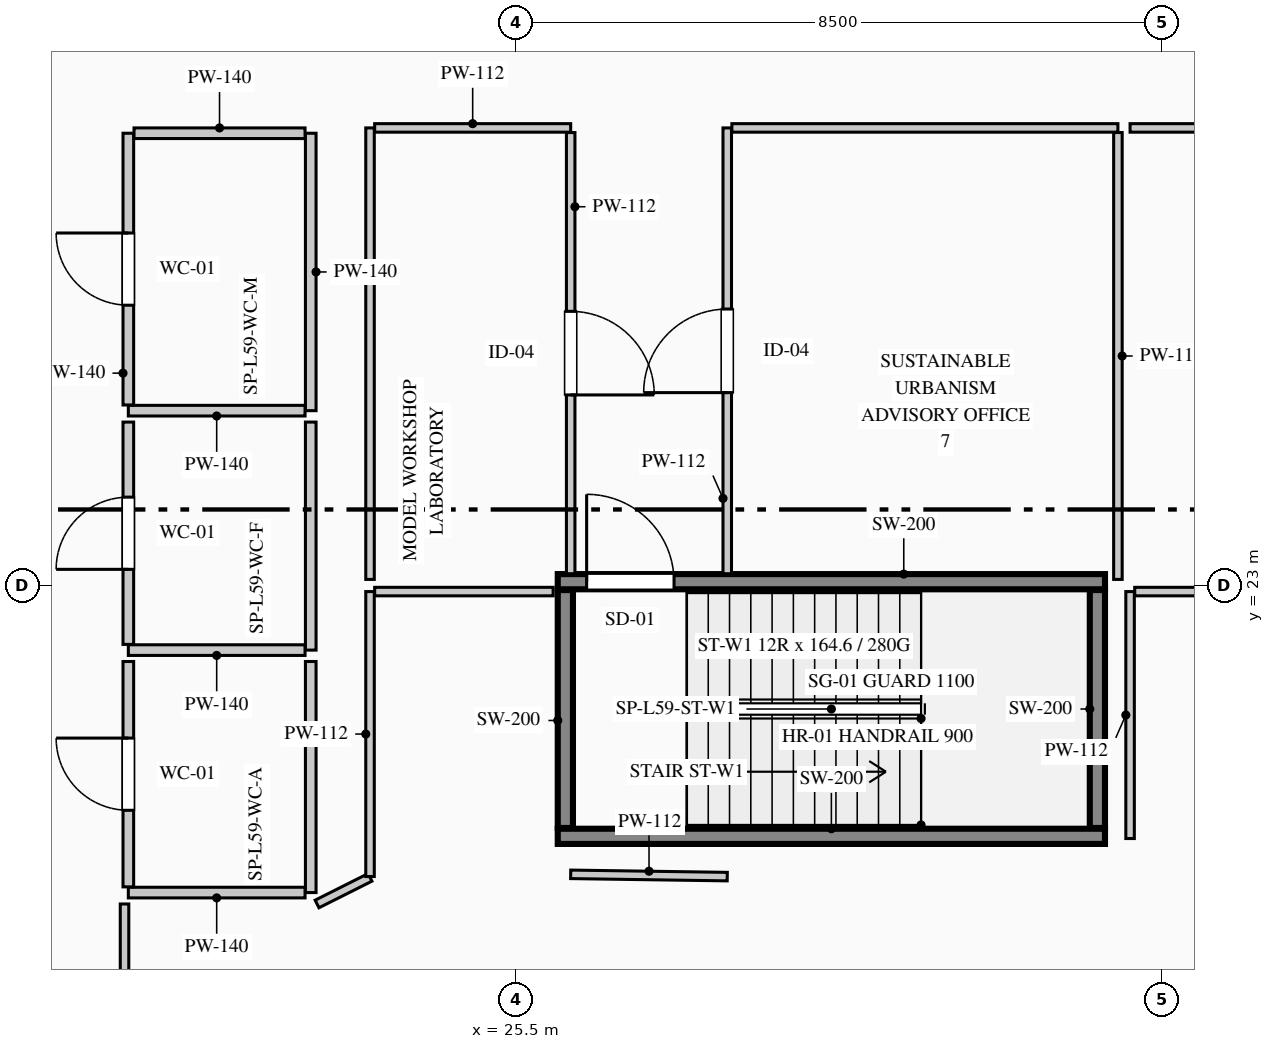
"""IFC4 building model, lengths in metres.
Left out: names, types, materials, properties, quantities, classifications, styles, units other than length and angle.
Written with IfcOpenShell. Run it as: python <this file> out.ifc"""

import sys

from ifc_helpers import new_model, si_unit, direction, frame, frame_2d, origin, place, context, subcontext, project, spatial, rectangle, extrude, element, fill, save


model = new_model("IFC4")
c1 = context("Model", 3, precision=1e-05, world=origin(), true_north=direction((0.0, 1.0)))
c2 = subcontext(c1, "Body", "Model", "MODEL_VIEW")
j1 = project(units=[si_unit("LENGTHUNIT", "METRE"), si_unit("PLANEANGLEUNIT", "RADIAN")], contexts=[c1])
p1 = place(None, origin())
s1 = spatial("IfcSite", under=j1, at=p1, CompositionType="ELEMENT")
p2 = place(p1, origin())
s2 = spatial("IfcBuilding", under=s1, at=p2, CompositionType="ELEMENT")
p3 = place(p2, frame((0.0, 0.0, 246.95)))
s3 = spatial("IfcBuildingStorey", under=s2, at=p3, CompositionType="ELEMENT", Elevation=246.95)
p4 = place(p3, frame((26.05, 19.7, 0.0), z_axis=(0.0, 0.0, 1.0), x_axis=(1.0, 0.0, 0.0)))
e1 = element("IfcWall", 1, at=p4, inside=s3, PredefinedType="SHEAR", context=c2, shape_type="SweptSolid", body=[
    extrude(rectangle(XDim=7.2, YDim=0.2, at=frame_2d((3.6, 0.0))), origin(), (0.0, 0.0, 1.0), 3.95),
])
p5 = place(p3, frame((26.05, 23.05, 0.0), z_axis=(0.0, 0.0, 1.0), x_axis=(1.0, 0.0, 0.0)))
e2 = element("IfcWall", 2, at=p5, inside=s3, PredefinedType="SHEAR", context=c2, shape_type="SweptSolid", body=[
    extrude(rectangle(XDim=7.2, YDim=0.2, at=frame_2d((3.6, 0.0))), origin(), (0.0, 0.0, 1.0), 3.95),
])
p6 = place(p5, frame((0.38, 0.0, 0.0)))
e3 = element("IfcOpeningElement", 3, at=p6, cuts=e2, PredefinedType="OPENING", context=c2, shape_type="SweptSolid", body=[
    extrude(rectangle(XDim=1.15, YDim=2.2, at=frame_2d((0.575, 1.1))), frame((0.0, 0.11, 0.0), z_axis=(0.0, -1.0, 0.0), x_axis=(1.0, 0.0, 0.0)), (0.0, 0.0, 1.0), 0.22),
])
for number, where, z_axis, x_axis in (
    (4, (26.15, 19.81, 0.0), (0.0, 0.0, 1.0), (0.0, 1.0, 0.0)),
    (5, (33.15, 19.81, 0.0), (0.0, 0.0, 1.0), (0.0, 1.0, 0.0)),
):
    element("IfcWall", number, at=place(p3, frame(where, z_axis=z_axis, x_axis=x_axis)), inside=s3, PredefinedType="SHEAR", context=c2, shape_type="SweptSolid", body=[
        extrude(rectangle(XDim=3.13, YDim=0.2, at=frame_2d((1.565, 0.0))), origin(), (0.0, 0.0, 1.0), 3.95),
    ])
p7 = place(p3, frame((22.8, 28.95, 0.0), z_axis=(0.0, 0.0, 1.0), x_axis=(0.0, -1.0, 0.0)))
e6 = element("IfcWall", 6, at=p7, inside=s3, PredefinedType="PARTITIONING", context=c2, shape_type="SweptSolid", body=[
    extrude(rectangle(XDim=3.65, YDim=0.14, at=frame_2d((1.825, 0.0))), origin(), (0.0, 0.0, 1.0), 3.285),
])
p8 = place(p3, frame((22.725, 25.3, 0.0), z_axis=(0.0, 0.0, 1.0), x_axis=(-1.0, 0.0, 0.0)))
e7 = element("IfcWall", 7, at=p8, inside=s3, PredefinedType="PARTITIONING", context=c2, shape_type="SweptSolid", body=[
    extrude(rectangle(XDim=2.325, YDim=0.14, at=frame_2d((1.163, 0.0))), origin(), (0.0, 0.0, 1.0), 3.6),
])
p9 = place(p3, frame((20.4, 25.375, 0.0), z_axis=(0.0, 0.0, 1.0), x_axis=(0.0, 1.0, 0.0)))
e8 = element("IfcWall", 8, at=p9, inside=s3, PredefinedType="PARTITIONING", context=c2, shape_type="SweptSolid", body=[
    extrude(rectangle(XDim=3.575, YDim=0.14, at=frame_2d((1.788, 0.0))), origin(), (0.0, 0.0, 1.0), 3.6),
])
p10 = place(p9, frame((1.312, 0.0, 0.0)))
e9 = element("IfcOpeningElement", 9, at=p10, cuts=e8, PredefinedType="OPENING", context=c2, shape_type="SweptSolid", body=[
    extrude(rectangle(XDim=0.95, YDim=2.15, at=frame_2d((0.475, 1.075))), frame((0.0, 0.08, 0.0), z_axis=(0.0, -1.0, 0.0), x_axis=(1.0, 0.0, 0.0)), (0.0, 0.0, 1.0), 0.16),
])
p11 = place(p3, frame((20.475, 28.95, 0.0), z_axis=(0.0, 0.0, 1.0), x_axis=(1.0, 0.0, 0.0)))
e10 = element("IfcWall", 10, at=p11, inside=s3, PredefinedType="PARTITIONING", context=c2, shape_type="SweptSolid", body=[
    extrude(rectangle(XDim=2.25, YDim=0.14, at=frame_2d((1.125, 0.0))), origin(), (0.0, 0.0, 1.0), 3.6),
])
p12 = place(p3, frame((22.8, 25.15, 0.0), z_axis=(0.0, 0.0, 1.0), x_axis=(0.0, -1.0, 0.0)))
e11 = element("IfcWall", 11, at=p12, inside=s3, PredefinedType="PARTITIONING", context=c2, shape_type="SweptSolid", body=[
    extrude(rectangle(XDim=3.0, YDim=0.14, at=frame_2d((1.5, 0.0))), origin(), (0.0, 0.0, 1.0), 3.285),
])
p13 = place(p3, frame((22.725, 22.15, 0.0), z_axis=(0.0, 0.0, 1.0), x_axis=(-1.0, 0.0, 0.0)))
e12 = element("IfcWall", 12, at=p13, inside=s3, PredefinedType="PARTITIONING", context=c2, shape_type="SweptSolid", body=[
    extrude(rectangle(XDim=2.325, YDim=0.14, at=frame_2d((1.163, 0.0))), origin(), (0.0, 0.0, 1.0), 3.6),
])
p14 = place(p3, frame((20.4, 22.225, 0.0), z_axis=(0.0, 0.0, 1.0), x_axis=(0.0, 1.0, 0.0)))
e13 = element("IfcWall", 13, at=p14, inside=s3, PredefinedType="PARTITIONING", context=c2, shape_type="SweptSolid", body=[
    extrude(rectangle(XDim=2.925, YDim=0.14, at=frame_2d((1.462, 0.0))), origin(), (0.0, 0.0, 1.0), 3.6),
])
p15 = place(p14, frame((0.988, 0.0, 0.0)))
e14 = element("IfcOpeningElement", 14, at=p15, cuts=e13, PredefinedType="OPENING", context=c2, shape_type="SweptSolid", body=[
    extrude(rectangle(XDim=0.95, YDim=2.15, at=frame_2d((0.475, 1.075))), frame((0.0, 0.08, 0.0), z_axis=(0.0, -1.0, 0.0), x_axis=(1.0, 0.0, 0.0)), (0.0, 0.0, 1.0), 0.16),
])
p16 = place(p3, frame((22.8, 22.0, 0.0), z_axis=(0.0, 0.0, 1.0), x_axis=(0.0, -1.0, 0.0)))
e15 = element("IfcWall", 15, at=p16, inside=s3, PredefinedType="PARTITIONING", context=c2, shape_type="SweptSolid", body=[
    extrude(rectangle(XDim=3.04, YDim=0.14, at=frame_2d((1.52, 0.0))), origin(), (0.0, 0.0, 1.0), 3.285),
])
p17 = place(p3, frame((22.725, 18.96, 0.0), z_axis=(0.0, 0.0, 1.0), x_axis=(-1.0, 0.0, 0.0)))
e16 = element("IfcWall", 16, at=p17, inside=s3, PredefinedType="PARTITIONING", context=c2, shape_type="SweptSolid", body=[
    extrude(rectangle(XDim=2.325, YDim=0.14, at=frame_2d((1.163, 0.0))), origin(), (0.0, 0.0, 1.0), 3.6),
])
p18 = place(p3, frame((20.4, 19.035, 0.0), z_axis=(0.0, 0.0, 1.0), x_axis=(0.0, 1.0, 0.0)))
e17 = element("IfcWall", 17, at=p18, inside=s3, PredefinedType="PARTITIONING", context=c2, shape_type="SweptSolid", body=[
    extrude(rectangle(XDim=2.965, YDim=0.14, at=frame_2d((1.482, 0.0))), origin(), (0.0, 0.0, 1.0), 3.6),
])
p19 = place(p18, frame((1.008, 0.0, 0.0)))
e18 = element("IfcOpeningElement", 18, at=p19, cuts=e17, PredefinedType="OPENING", context=c2, shape_type="SweptSolid", body=[
    extrude(rectangle(XDim=0.95, YDim=2.15, at=frame_2d((0.475, 1.075))), frame((0.0, 0.08, 0.0), z_axis=(0.0, -1.0, 0.0), x_axis=(1.0, 0.0, 0.0)), (0.0, 0.0, 1.0), 0.16),
])
p20 = place(p3, frame((33.58, 19.671, 0.0), z_axis=(0.0, 0.0, 1.0), x_axis=(0.0, 1.0, 0.0)))
e19 = element("IfcWall", 19, at=p20, inside=s3, PredefinedType="PARTITIONING", context=c2, shape_type="SweptSolid", body=[
    extrude(rectangle(XDim=3.249, YDim=0.112, at=frame_2d((1.625, 0.0))), origin(), (0.0, 0.0, 1.0), 3.6),
])
p21 = place(p3, frame((33.641, 22.92, 0.0), z_axis=(0.0, 0.0, 1.0), x_axis=(1.0, 0.0, 0.0)))
e20 = element("IfcWall", 20, at=p21, inside=s3, PredefinedType="PARTITIONING", context=c2, shape_type="SweptSolid", body=[
    extrude(rectangle(XDim=5.487, YDim=0.112, at=frame_2d((2.744, 0.0))), origin(), (0.0, 0.0, 1.0), 3.6),
])
p22 = place(p3, frame((20.35, 12.689, 0.0), z_axis=(0.0, 0.0, 1.0), x_axis=(0.0, 1.0, 0.0)))
e21 = element("IfcWall", 21, at=p22, inside=s3, PredefinedType="PARTITIONING", context=c2, shape_type="SweptSolid", body=[
    extrude(rectangle(XDim=6.121, YDim=0.112, at=frame_2d((3.061, 0.0))), origin(), (0.0, 0.0, 1.0), 3.6),
])
p23 = place(p22, frame((2.511, 0.0, 0.0)))
e22 = element("IfcOpeningElement", 22, at=p23, cuts=e21, PredefinedType="OPENING", context=c2, shape_type="SweptSolid", body=[
    extrude(rectangle(XDim=1.1, YDim=2.2, at=frame_2d((0.55, 1.1))), frame((0.0, 0.066, 0.0), z_axis=(0.0, -1.0, 0.0), x_axis=(1.0, 0.0, 0.0)), (0.0, 0.0, 1.0), 0.132),
])
p24 = place(p3, frame((22.883, 18.81, 0.0), z_axis=(0.0, 0.0, 1.0), x_axis=(0.893737436086, 0.448590453909, 0.0)))
e23 = element("IfcWall", 23, at=p24, inside=s3, PredefinedType="PARTITIONING", context=c2, shape_type="SweptSolid", body=[
    extrude(rectangle(XDim=0.78, YDim=0.112, at=frame_2d((0.39, 0.0))), origin(), (0.0, 0.0, 1.0), 3.6),
])
p25 = place(p3, frame((23.58, 19.171, 0.0), z_axis=(0.0, 0.0, 1.0), x_axis=(0.0, 1.0, 0.0)))
e24 = element("IfcWall", 24, at=p25, inside=s3, PredefinedType="PARTITIONING", context=c2, shape_type="SweptSolid", body=[
    extrude(rectangle(XDim=3.749, YDim=0.112, at=frame_2d((1.875, 0.0))), origin(), (0.0, 0.0, 1.0), 3.6),
])
p26 = place(p3, frame((23.641, 22.92, 0.0), z_axis=(0.0, 0.0, 1.0), x_axis=(1.0, 0.0, 0.0)))
e25 = element("IfcWall", 25, at=p26, inside=s3, PredefinedType="PARTITIONING", context=c2, shape_type="SweptSolid", body=[
    extrude(rectangle(XDim=2.348, YDim=0.112, at=frame_2d((1.174, 0.0))), origin(), (0.0, 0.0, 1.0), 3.6),
])
p27 = place(p3, frame((26.22, 19.2, 0.0), z_axis=(0.0, 0.0, 1.0), x_axis=(0.999893773718, -0.014575365509, 0.0)))
e26 = element("IfcWall", 26, at=p27, inside=s3, PredefinedType="PARTITIONING", context=c2, shape_type="SweptSolid", body=[
    extrude(rectangle(XDim=2.06, YDim=0.112, at=frame_2d((1.03, 0.0))), origin(), (0.0, 0.0, 1.0), 3.6),
])
p28 = place(p3, frame((23.58, 23.08, 0.0), z_axis=(0.0, 0.0, 1.0), x_axis=(0.0, 1.0, 0.0)))
e27 = element("IfcWall", 27, at=p28, inside=s3, PredefinedType="PARTITIONING", context=c2, shape_type="SweptSolid", body=[
    extrude(rectangle(XDim=5.94, YDim=0.112, at=frame_2d((2.97, 0.0))), origin(), (0.0, 0.0, 1.0), 3.6),
])
p29 = place(p3, frame((23.641, 29.02, 0.0), z_axis=(0.0, 0.0, 1.0), x_axis=(1.0, 0.0, 0.0)))
e28 = element("IfcWall", 28, at=p29, inside=s3, PredefinedType="PARTITIONING", context=c2, shape_type="SweptSolid", body=[
    extrude(rectangle(XDim=2.579, YDim=0.112, at=frame_2d((1.29, 0.0))), origin(), (0.0, 0.0, 1.0), 3.6),
])
p30 = place(p3, frame((26.22, 28.959, 0.0), z_axis=(0.0, 0.0, 1.0), x_axis=(0.0, -1.0, 0.0)))
e29 = element("IfcWall", 29, at=p30, inside=s3, PredefinedType="PARTITIONING", context=c2, shape_type="SweptSolid", body=[
    extrude(rectangle(XDim=5.804, YDim=0.112, at=frame_2d((2.902, 0.0))), origin(), (0.0, 0.0, 1.0), 3.6),
])
p31 = place(p30, frame((2.352, 0.0, 0.0)))
e30 = element("IfcOpeningElement", 30, at=p31, cuts=e29, PredefinedType="OPENING", context=c2, shape_type="SweptSolid", body=[
    extrude(rectangle(XDim=1.1, YDim=2.2, at=frame_2d((0.55, 1.1))), frame((0.0, 0.066, 0.0), z_axis=(0.0, -1.0, 0.0), x_axis=(1.0, 0.0, 0.0)), (0.0, 0.0, 1.0), 0.132),
])
p32 = place(p3, frame((28.28, 23.155, 0.0), z_axis=(0.0, 0.0, 1.0), x_axis=(0.0, 1.0, 0.0)))
e31 = element("IfcWall", 31, at=p32, inside=s3, PredefinedType="PARTITIONING", context=c2, shape_type="SweptSolid", body=[
    extrude(rectangle(XDim=5.865, YDim=0.112, at=frame_2d((2.933, 0.0))), origin(), (0.0, 0.0, 1.0), 3.6),
])
p33 = place(p32, frame((2.383, 0.0, 0.0)))
e32 = element("IfcOpeningElement", 32, at=p33, cuts=e31, PredefinedType="OPENING", context=c2, shape_type="SweptSolid", body=[
    extrude(rectangle(XDim=1.1, YDim=2.2, at=frame_2d((0.55, 1.1))), frame((0.0, 0.066, 0.0), z_axis=(0.0, -1.0, 0.0), x_axis=(1.0, 0.0, 0.0)), (0.0, 0.0, 1.0), 0.132),
])
p34 = place(p3, frame((28.341, 29.02, 0.0), z_axis=(0.0, 0.0, 1.0), x_axis=(1.0, 0.0, 0.0)))
e33 = element("IfcWall", 33, at=p34, inside=s3, PredefinedType="PARTITIONING", context=c2, shape_type="SweptSolid", body=[
    extrude(rectangle(XDim=5.079, YDim=0.112, at=frame_2d((2.54, 0.0))), origin(), (0.0, 0.0, 1.0), 3.6),
])
p35 = place(p3, frame((33.42, 28.959, 0.0), z_axis=(0.0, 0.0, 1.0), x_axis=(0.0, -1.0, 0.0)))
e34 = element("IfcWall", 34, at=p35, inside=s3, PredefinedType="PARTITIONING", context=c2, shape_type="SweptSolid", body=[
    extrude(rectangle(XDim=5.879, YDim=0.112, at=frame_2d((2.939, 0.0))), origin(), (0.0, 0.0, 1.0), 3.6),
])
p36 = place(p3, frame((33.58, 29.02, 0.0), z_axis=(0.0, 0.0, 1.0), x_axis=(1.0, 0.0, 0.0)))
e35 = element("IfcWall", 35, at=p36, inside=s3, PredefinedType="PARTITIONING", context=c2, shape_type="SweptSolid", body=[
    extrude(rectangle(XDim=4.1, YDim=0.112, at=frame_2d((2.05, 0.0))), origin(), (0.0, 0.0, 1.0), 3.6),
])
p37 = place(p36, frame((1.5, 0.0, 0.0)))
e36 = element("IfcOpeningElement", 36, at=p37, cuts=e35, PredefinedType="OPENING", context=c2, shape_type="SweptSolid", body=[
    extrude(rectangle(XDim=1.1, YDim=2.2, at=frame_2d((0.55, 1.1))), frame((0.0, 0.066, 0.0), z_axis=(0.0, -1.0, 0.0), x_axis=(1.0, 0.0, 0.0)), (0.0, 0.0, 1.0), 0.132),
])
p38 = place(p6, origin())
e37 = element("IfcDoor", 37, at=p38, inside=s3, OperationType="SINGLE_SWING_LEFT", PredefinedType="DOOR", context=c2, shape_type="SweptSolid", body=[
    extrude(rectangle(XDim=1.15, YDim=2.2, at=frame_2d((0.575, 1.1))), frame((0.0, 0.025, 0.0), z_axis=(0.0, -1.0, 0.0), x_axis=(1.0, 0.0, 0.0)), (0.0, 0.0, 1.0), 0.05),
])
fill(e3, e37)
p39 = place(p10, origin())
e38 = element("IfcDoor", 38, at=p39, inside=s3, OperationType="SINGLE_SWING_RIGHT", PredefinedType="DOOR", context=c2, shape_type="SweptSolid", body=[
    extrude(rectangle(XDim=0.95, YDim=2.15, at=frame_2d((0.475, 1.075))), frame((0.0, 0.025, 0.0), z_axis=(0.0, -1.0, 0.0), x_axis=(1.0, 0.0, 0.0)), (0.0, 0.0, 1.0), 0.05),
])
fill(e9, e38)
p40 = place(p15, origin())
e39 = element("IfcDoor", 39, at=p40, inside=s3, OperationType="SINGLE_SWING_LEFT", PredefinedType="DOOR", context=c2, shape_type="SweptSolid", body=[
    extrude(rectangle(XDim=0.95, YDim=2.15, at=frame_2d((0.475, 1.075))), frame((0.0, 0.025, 0.0), z_axis=(0.0, -1.0, 0.0), x_axis=(1.0, 0.0, 0.0)), (0.0, 0.0, 1.0), 0.05),
])
fill(e14, e39)
p41 = place(p19, origin())
e40 = element("IfcDoor", 40, at=p41, inside=s3, OperationType="SINGLE_SWING_RIGHT", PredefinedType="DOOR", context=c2, shape_type="SweptSolid", body=[
    extrude(rectangle(XDim=0.95, YDim=2.15, at=frame_2d((0.475, 1.075))), frame((0.0, 0.025, 0.0), z_axis=(0.0, -1.0, 0.0), x_axis=(1.0, 0.0, 0.0)), (0.0, 0.0, 1.0), 0.05),
])
fill(e18, e40)
p42 = place(p31, origin())
e41 = element("IfcDoor", 41, at=p42, inside=s3, OperationType="SINGLE_SWING_RIGHT", PredefinedType="DOOR", context=c2, shape_type="SweptSolid", body=[
    extrude(rectangle(XDim=1.1, YDim=2.2, at=frame_2d((0.55, 1.1))), frame((0.0, 0.025, 0.0), z_axis=(0.0, -1.0, 0.0), x_axis=(1.0, 0.0, 0.0)), (0.0, 0.0, 1.0), 0.05),
])
fill(e30, e41)
p43 = place(p33, origin())
e42 = element("IfcDoor", 42, at=p43, inside=s3, OperationType="SINGLE_SWING_LEFT", PredefinedType="DOOR", context=c2, shape_type="SweptSolid", body=[
    extrude(rectangle(XDim=1.1, YDim=2.2, at=frame_2d((0.55, 1.1))), frame((0.0, 0.025, 0.0), z_axis=(0.0, -1.0, 0.0), x_axis=(1.0, 0.0, 0.0)), (0.0, 0.0, 1.0), 0.05),
])
fill(e32, e42)
save(model, sys.argv[1])
